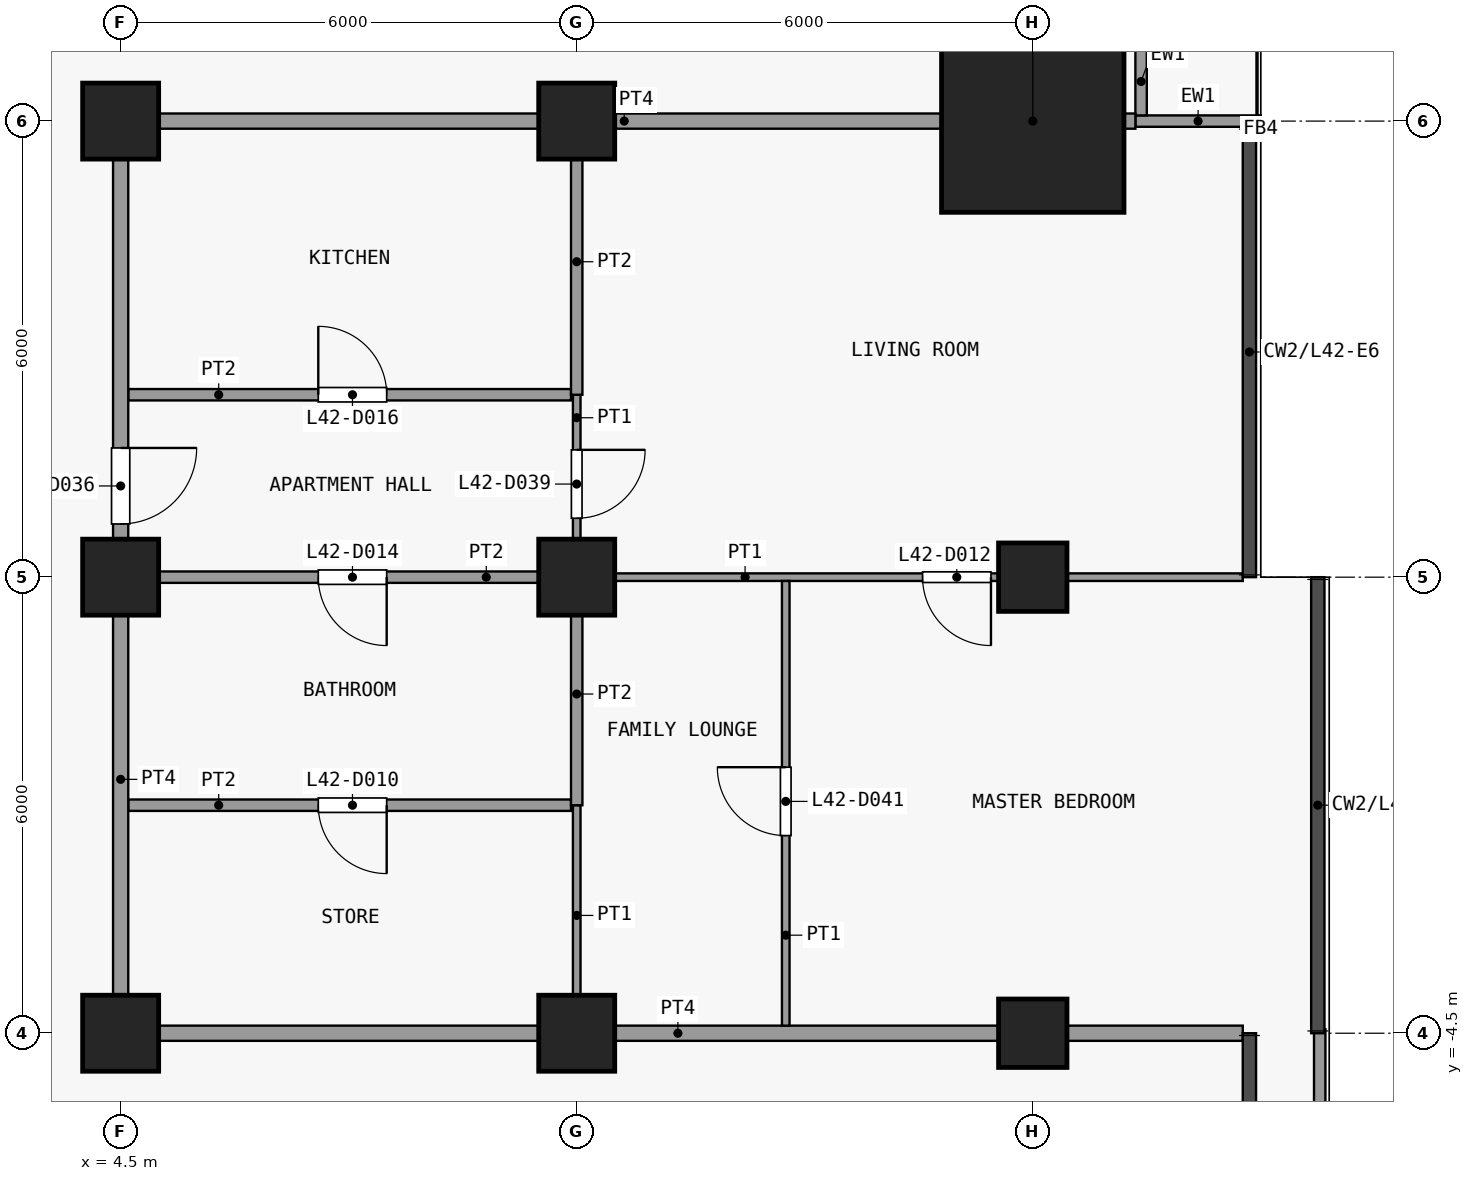
"""IFC4 building model, lengths in metres.
Left out: names, types, materials, properties, quantities, classifications, styles, units other than length and angle.
Written with IfcOpenShell. Run it as: python <this file> out.ifc"""

import sys

from ifc_helpers import new_model, si_unit, direction, frame, frame_2d, origin, origin_2d, place, context, subcontext, project, spatial, rectangle, extrude, element, fill, save


model = new_model("IFC4")
c1 = context("Model", 3, precision=1e-05, world=origin(), true_north=direction((0.0, 1.0)))
c2 = subcontext(c1, "Body", "Model", "MODEL_VIEW")
j1 = project(units=[si_unit("LENGTHUNIT", "METRE"), si_unit("PLANEANGLEUNIT", "RADIAN")], contexts=[c1])
p1 = place(None, origin())
s1 = spatial("IfcSite", under=j1, at=p1, CompositionType="ELEMENT")
p2 = place(p1, origin())
s2 = spatial("IfcBuilding", under=s1, at=p2, CompositionType="ELEMENT")
p3 = place(p2, frame((0.0, 0.0, 170.9)))
s3 = spatial("IfcBuildingStorey", under=s2, at=p3, CompositionType="ELEMENT", Elevation=170.9)
for number, where, z_axis, x_axis in (
    (1, (4.5, -4.5, 0.0), (0.0, 0.0, 1.0), (1.0, 0.0, 0.0)),
    (2, (4.5, 1.5, 0.0), (0.0, 0.0, 1.0), (1.0, 0.0, 0.0)),
    (3, (4.5, 7.5, 0.0), (0.0, 0.0, 1.0), (1.0, 0.0, 0.0)),
    (4, (10.5, -4.5, 0.0), (0.0, 0.0, 1.0), (1.0, 0.0, 0.0)),
    (5, (10.5, 1.5, 0.0), (0.0, 0.0, 1.0), (1.0, 0.0, 0.0)),
    (6, (10.5, 7.5, 0.0), (0.0, 0.0, 1.0), (1.0, 0.0, 0.0)),
):
    element("IfcColumn", number, at=place(p3, frame(where, z_axis=z_axis, x_axis=x_axis)), inside=s3, PredefinedType="COLUMN", context=c2, shape_type="SweptSolid", body=[
        extrude(rectangle(XDim=1.0, YDim=1.0, at=origin_2d()), origin(), (0.0, 0.0, 1.0), 3.6),
    ])
for number, where, z_axis, x_axis in (
    (7, (16.5, -4.5, 0.0), (0.0, 0.0, 1.0), (1.0, 0.0, 0.0)),
    (8, (16.5, 1.5, 0.0), (0.0, 0.0, 1.0), (1.0, 0.0, 0.0)),
):
    element("IfcColumn", number, at=place(p3, frame(where, z_axis=z_axis, x_axis=x_axis)), inside=s3, PredefinedType="COLUMN", context=c2, shape_type="SweptSolid", body=[
        extrude(rectangle(XDim=0.9, YDim=0.9, at=origin_2d()), origin(), (0.0, 0.0, 1.0), 3.6),
    ])
p4 = place(p3, frame((16.5, 7.5, 0.0), z_axis=(0.0, 0.0, 1.0), x_axis=(1.0, 0.0, 0.0)))
e9 = element("IfcColumn", 9, at=p4, inside=s3, PredefinedType="COLUMN", context=c2, shape_type="SweptSolid", body=[
    extrude(rectangle(XDim=2.4, YDim=2.4, at=origin_2d()), origin(), (0.0, 0.0, 1.0), 3.6),
])
p5 = place(p3, frame((17.85, 7.5, 0.0), z_axis=(0.0, 0.0, 1.0), x_axis=(1.0, 0.0, 0.0)))
e10 = element("IfcWall", 10, at=p5, inside=s3, PredefinedType="SOLIDWALL", context=c2, shape_type="SweptSolid", body=[
    extrude(rectangle(XDim=1.65, YDim=0.15, at=frame_2d((0.825, 0.0))), origin(), (0.0, 0.0, 1.0), 3.3),
])
p6 = place(p3, frame((17.925, 13.425, 0.0), z_axis=(0.0, 0.0, 1.0), x_axis=(0.0, -1.0, 0.0)))
e11 = element("IfcWall", 11, at=p6, inside=s3, PredefinedType="SOLIDWALL", context=c2, shape_type="SweptSolid", body=[
    extrude(rectangle(XDim=5.85, YDim=0.15, at=frame_2d((2.925, 0.0))), origin(), (0.0, 0.0, 1.0), 3.3),
])
p7 = place(p6, frame((0.825, 0.0, 0.0)))
e12 = element("IfcOpeningElement", 12, at=p7, cuts=e11, PredefinedType="OPENING", context=c2, shape_type="SweptSolid", body=[
    extrude(rectangle(XDim=1.2, YDim=2.4, at=frame_2d((0.6, 1.2))), frame((0.0, 0.085, 0.0), z_axis=(0.0, -1.0, 0.0), x_axis=(1.0, 0.0, 0.0)), (0.0, 0.0, 1.0), 0.17),
])
p8 = place(p6, frame((3.038, 0.0, 0.9)))
e13 = element("IfcOpeningElement", 13, at=p8, cuts=e11, PredefinedType="OPENING", context=c2, shape_type="SweptSolid", body=[
    extrude(rectangle(XDim=1.8, YDim=2.1, at=frame_2d((0.9, 1.05))), frame((0.0, 0.085, 0.0), z_axis=(0.0, -1.0, 0.0), x_axis=(1.0, 0.0, 0.0)), (0.0, 0.0, 1.0), 0.17),
])
p9 = place(p3, frame((20.275, -4.448, 0.0), z_axis=(0.0, 0.0, 1.0), x_axis=(0.0, -1.0, 0.0)))
e14 = element("IfcWall", 14, at=p9, inside=s3, PredefinedType="PARAPET", context=c2, shape_type="SweptSolid", body=[
    extrude(rectangle(XDim=9.002, YDim=0.15, at=frame_2d((4.501, 0.0))), origin(), (0.0, 0.0, 1.0), 1.15),
])
p10 = place(p3, frame((4.4, -4.5, 0.0), z_axis=(0.0, 0.0, 1.0), x_axis=(1.0, 0.0, 0.0)))
e15 = element("IfcWall", 15, at=p10, inside=s3, PredefinedType="PARTITIONING", context=c2, shape_type="SweptSolid", body=[
    extrude(rectangle(XDim=14.863, YDim=0.2, at=frame_2d((7.431, 0.0))), origin(), (0.0, 0.0, 1.0), 3.3),
])
p11 = place(p3, frame((4.6, -1.5, 0.0), z_axis=(0.0, 0.0, 1.0), x_axis=(1.0, 0.0, 0.0)))
e16 = element("IfcWall", 16, at=p11, inside=s3, PredefinedType="PARTITIONING", context=c2, shape_type="SweptSolid", body=[
    extrude(rectangle(XDim=5.825, YDim=0.15, at=frame_2d((2.913, 0.0))), origin(), (0.0, 0.0, 1.0), 3.3),
])
p12 = place(p11, frame((2.5, 0.0, 0.0)))
e17 = element("IfcOpeningElement", 17, at=p12, cuts=e16, PredefinedType="OPENING", context=c2, shape_type="SweptSolid", body=[
    extrude(rectangle(XDim=0.9, YDim=2.1, at=frame_2d((0.45, 1.05))), frame((0.0, 0.085, 0.0), z_axis=(0.0, -1.0, 0.0), x_axis=(1.0, 0.0, 0.0)), (0.0, 0.0, 1.0), 0.17),
])
p13 = place(p3, frame((10.5, 1.5, 0.0), z_axis=(0.0, 0.0, 1.0), x_axis=(1.0, 0.0, 0.0)))
e18 = element("IfcWall", 18, at=p13, inside=s3, PredefinedType="PARTITIONING", context=c2, shape_type="SweptSolid", body=[
    extrude(rectangle(XDim=8.762, YDim=0.1, at=frame_2d((4.381, 0.0))), origin(), (0.0, 0.0, 1.0), 3.3),
])
p14 = place(p13, frame((4.55, 0.0, 0.0)))
e19 = element("IfcOpeningElement", 19, at=p14, cuts=e18, PredefinedType="OPENING", context=c2, shape_type="SweptSolid", body=[
    extrude(rectangle(XDim=0.9, YDim=2.1, at=frame_2d((0.45, 1.05))), frame((0.0, 0.06, 0.0), z_axis=(0.0, -1.0, 0.0), x_axis=(1.0, 0.0, 0.0)), (0.0, 0.0, 1.0), 0.12),
])
p15 = place(p3, frame((4.6, 1.5, 0.0), z_axis=(0.0, 0.0, 1.0), x_axis=(1.0, 0.0, 0.0)))
e20 = element("IfcWall", 20, at=p15, inside=s3, PredefinedType="PARTITIONING", context=c2, shape_type="SweptSolid", body=[
    extrude(rectangle(XDim=5.9, YDim=0.15, at=frame_2d((2.95, 0.0))), origin(), (0.0, 0.0, 1.0), 3.3),
])
p16 = place(p15, frame((2.5, 0.0, 0.0)))
e21 = element("IfcOpeningElement", 21, at=p16, cuts=e20, PredefinedType="OPENING", context=c2, shape_type="SweptSolid", body=[
    extrude(rectangle(XDim=0.9, YDim=2.1, at=frame_2d((0.45, 1.05))), frame((0.0, 0.085, 0.0), z_axis=(0.0, -1.0, 0.0), x_axis=(1.0, 0.0, 0.0)), (0.0, 0.0, 1.0), 0.17),
])
p17 = place(p3, frame((4.6, 3.9, 0.0), z_axis=(0.0, 0.0, 1.0), x_axis=(1.0, 0.0, 0.0)))
e22 = element("IfcWall", 22, at=p17, inside=s3, PredefinedType="PARTITIONING", context=c2, shape_type="SweptSolid", body=[
    extrude(rectangle(XDim=5.825, YDim=0.15, at=frame_2d((2.913, 0.0))), origin(), (0.0, 0.0, 1.0), 3.3),
])
p18 = place(p17, frame((2.5, 0.0, 0.0)))
e23 = element("IfcOpeningElement", 23, at=p18, cuts=e22, PredefinedType="OPENING", context=c2, shape_type="SweptSolid", body=[
    extrude(rectangle(XDim=0.9, YDim=2.1, at=frame_2d((0.45, 1.05))), frame((0.0, 0.085, 0.0), z_axis=(0.0, -1.0, 0.0), x_axis=(1.0, 0.0, 0.0)), (0.0, 0.0, 1.0), 0.17),
])
p19 = place(p3, frame((4.4, 7.5, 0.0), z_axis=(0.0, 0.0, 1.0), x_axis=(1.0, 0.0, 0.0)))
e24 = element("IfcWall", 24, at=p19, inside=s3, PredefinedType="PARTITIONING", context=c2, shape_type="SweptSolid", body=[
    extrude(rectangle(XDim=13.45, YDim=0.2, at=frame_2d((6.725, 0.0))), origin(), (0.0, 0.0, 1.0), 3.3),
])
p20 = place(p3, frame((4.5, -4.4, 0.0), z_axis=(0.0, 0.0, 1.0), x_axis=(0.0, 1.0, 0.0)))
e25 = element("IfcWall", 25, at=p20, inside=s3, PredefinedType="PARTITIONING", context=c2, shape_type="SweptSolid", body=[
    extrude(rectangle(XDim=11.8, YDim=0.2, at=frame_2d((5.9, 0.0))), origin(), (0.0, 0.0, 1.0), 3.3),
])
p21 = place(p20, frame((6.6, 0.0, 0.0)))
e26 = element("IfcOpeningElement", 26, at=p21, cuts=e25, PredefinedType="OPENING", context=c2, shape_type="SweptSolid", body=[
    extrude(rectangle(XDim=1.0, YDim=2.1, at=frame_2d((0.5, 1.05))), frame((0.0, 0.11, 0.0), z_axis=(0.0, -1.0, 0.0), x_axis=(1.0, 0.0, 0.0)), (0.0, 0.0, 1.0), 0.22),
])
p22 = place(p3, frame((10.5, -4.4, 0.0), z_axis=(0.0, 0.0, 1.0), x_axis=(0.0, 1.0, 0.0)))
e27 = element("IfcWall", 27, at=p22, inside=s3, PredefinedType="PARTITIONING", context=c2, shape_type="SweptSolid", body=[
    extrude(rectangle(XDim=2.9, YDim=0.1, at=frame_2d((1.45, 0.0))), origin(), (0.0, 0.0, 1.0), 3.3),
])
p23 = place(p3, frame((10.5, 1.575, 0.0), z_axis=(0.0, 0.0, 1.0), x_axis=(0.0, 1.0, 0.0)))
e28 = element("IfcWall", 28, at=p23, inside=s3, PredefinedType="PARTITIONING", context=c2, shape_type="SweptSolid", body=[
    extrude(rectangle(XDim=2.325, YDim=0.1, at=frame_2d((1.163, 0.0))), origin(), (0.0, 0.0, 1.0), 3.3),
])
p24 = place(p23, frame((0.7, 0.0, 0.0)))
e29 = element("IfcOpeningElement", 29, at=p24, cuts=e28, PredefinedType="OPENING", context=c2, shape_type="SweptSolid", body=[
    extrude(rectangle(XDim=0.9, YDim=2.1, at=frame_2d((0.45, 1.05))), frame((0.0, 0.06, 0.0), z_axis=(0.0, -1.0, 0.0), x_axis=(1.0, 0.0, 0.0)), (0.0, 0.0, 1.0), 0.12),
])
p25 = place(p3, frame((10.5, -1.5, 0.0), z_axis=(0.0, 0.0, 1.0), x_axis=(0.0, 1.0, 0.0)))
e30 = element("IfcWall", 30, at=p25, inside=s3, PredefinedType="PARTITIONING", context=c2, shape_type="SweptSolid", body=[
    extrude(rectangle(XDim=2.925, YDim=0.15, at=frame_2d((1.462, 0.0))), origin(), (0.0, 0.0, 1.0), 3.3),
])
p26 = place(p3, frame((10.5, 3.9, 0.0), z_axis=(0.0, 0.0, 1.0), x_axis=(0.0, 1.0, 0.0)))
e31 = element("IfcWall", 31, at=p26, inside=s3, PredefinedType="PARTITIONING", context=c2, shape_type="SweptSolid", body=[
    extrude(rectangle(XDim=3.5, YDim=0.15, at=frame_2d((1.75, 0.0))), origin(), (0.0, 0.0, 1.0), 3.3),
])
p27 = place(p3, frame((13.25, -4.4, 0.0), z_axis=(0.0, 0.0, 1.0), x_axis=(0.0, 1.0, 0.0)))
e32 = element("IfcWall", 32, at=p27, inside=s3, PredefinedType="PARTITIONING", context=c2, shape_type="SweptSolid", body=[
    extrude(rectangle(XDim=5.85, YDim=0.1, at=frame_2d((2.925, 0.0))), origin(), (0.0, 0.0, 1.0), 3.3),
])
p28 = place(p27, frame((2.5, 0.0, 0.0)))
e33 = element("IfcOpeningElement", 33, at=p28, cuts=e32, PredefinedType="OPENING", context=c2, shape_type="SweptSolid", body=[
    extrude(rectangle(XDim=0.9, YDim=2.1, at=frame_2d((0.45, 1.05))), frame((0.0, 0.06, 0.0), z_axis=(0.0, -1.0, 0.0), x_axis=(1.0, 0.0, 0.0)), (0.0, 0.0, 1.0), 0.12),
])
p29 = place(p12, origin())
e34 = element("IfcDoor", 34, at=p29, inside=s3, OperationType="SINGLE_SWING_RIGHT", PredefinedType="DOOR", context=c2, shape_type="SweptSolid", body=[
    extrude(rectangle(XDim=0.9, YDim=2.1, at=frame_2d((0.45, 1.05))), frame((0.0, 0.025, 0.0), z_axis=(0.0, -1.0, 0.0), x_axis=(1.0, 0.0, 0.0)), (0.0, 0.0, 1.0), 0.05),
])
fill(e17, e34)
p30 = place(p14, origin())
e35 = element("IfcDoor", 35, at=p30, inside=s3, OperationType="SINGLE_SWING_RIGHT", PredefinedType="DOOR", context=c2, shape_type="SweptSolid", body=[
    extrude(rectangle(XDim=0.9, YDim=2.1, at=frame_2d((0.45, 1.05))), frame((0.0, 0.025, 0.0), z_axis=(0.0, -1.0, 0.0), x_axis=(1.0, 0.0, 0.0)), (0.0, 0.0, 1.0), 0.05),
])
fill(e19, e35)
p31 = place(p16, origin())
e36 = element("IfcDoor", 36, at=p31, inside=s3, OperationType="SINGLE_SWING_RIGHT", PredefinedType="DOOR", context=c2, shape_type="SweptSolid", body=[
    extrude(rectangle(XDim=0.9, YDim=2.1, at=frame_2d((0.45, 1.05))), frame((0.0, 0.025, 0.0), z_axis=(0.0, -1.0, 0.0), x_axis=(1.0, 0.0, 0.0)), (0.0, 0.0, 1.0), 0.05),
])
fill(e21, e36)
p32 = place(p18, origin())
e37 = element("IfcDoor", 37, at=p32, inside=s3, OperationType="SINGLE_SWING_RIGHT", PredefinedType="DOOR", context=c2, shape_type="SweptSolid", body=[
    extrude(rectangle(XDim=0.9, YDim=2.1, at=frame_2d((0.45, 1.05))), frame((0.0, 0.025, 0.0), z_axis=(0.0, -1.0, 0.0), x_axis=(1.0, 0.0, 0.0)), (0.0, 0.0, 1.0), 0.05),
])
fill(e23, e37)
p33 = place(p21, origin())
e38 = element("IfcDoor", 38, at=p33, inside=s3, OperationType="SINGLE_SWING_RIGHT", PredefinedType="DOOR", context=c2, shape_type="SweptSolid", body=[
    extrude(rectangle(XDim=1.0, YDim=2.1, at=frame_2d((0.5, 1.05))), frame((0.0, 0.025, 0.0), z_axis=(0.0, -1.0, 0.0), x_axis=(1.0, 0.0, 0.0)), (0.0, 0.0, 1.0), 0.05),
])
fill(e26, e38)
p34 = place(p24, origin())
e39 = element("IfcDoor", 39, at=p34, inside=s3, OperationType="SINGLE_SWING_RIGHT", PredefinedType="DOOR", context=c2, shape_type="SweptSolid", body=[
    extrude(rectangle(XDim=0.9, YDim=2.1, at=frame_2d((0.45, 1.05))), frame((0.0, 0.025, 0.0), z_axis=(0.0, -1.0, 0.0), x_axis=(1.0, 0.0, 0.0)), (0.0, 0.0, 1.0), 0.05),
])
fill(e29, e39)
p35 = place(p28, origin())
e40 = element("IfcDoor", 40, at=p35, inside=s3, OperationType="SINGLE_SWING_LEFT", PredefinedType="DOOR", context=c2, shape_type="SweptSolid", body=[
    extrude(rectangle(XDim=0.9, YDim=2.1, at=frame_2d((0.45, 1.05))), frame((0.0, 0.025, 0.0), z_axis=(0.0, -1.0, 0.0), x_axis=(1.0, 0.0, 0.0)), (0.0, 0.0, 1.0), 0.05),
])
fill(e33, e40)
save(model, sys.argv[1])
